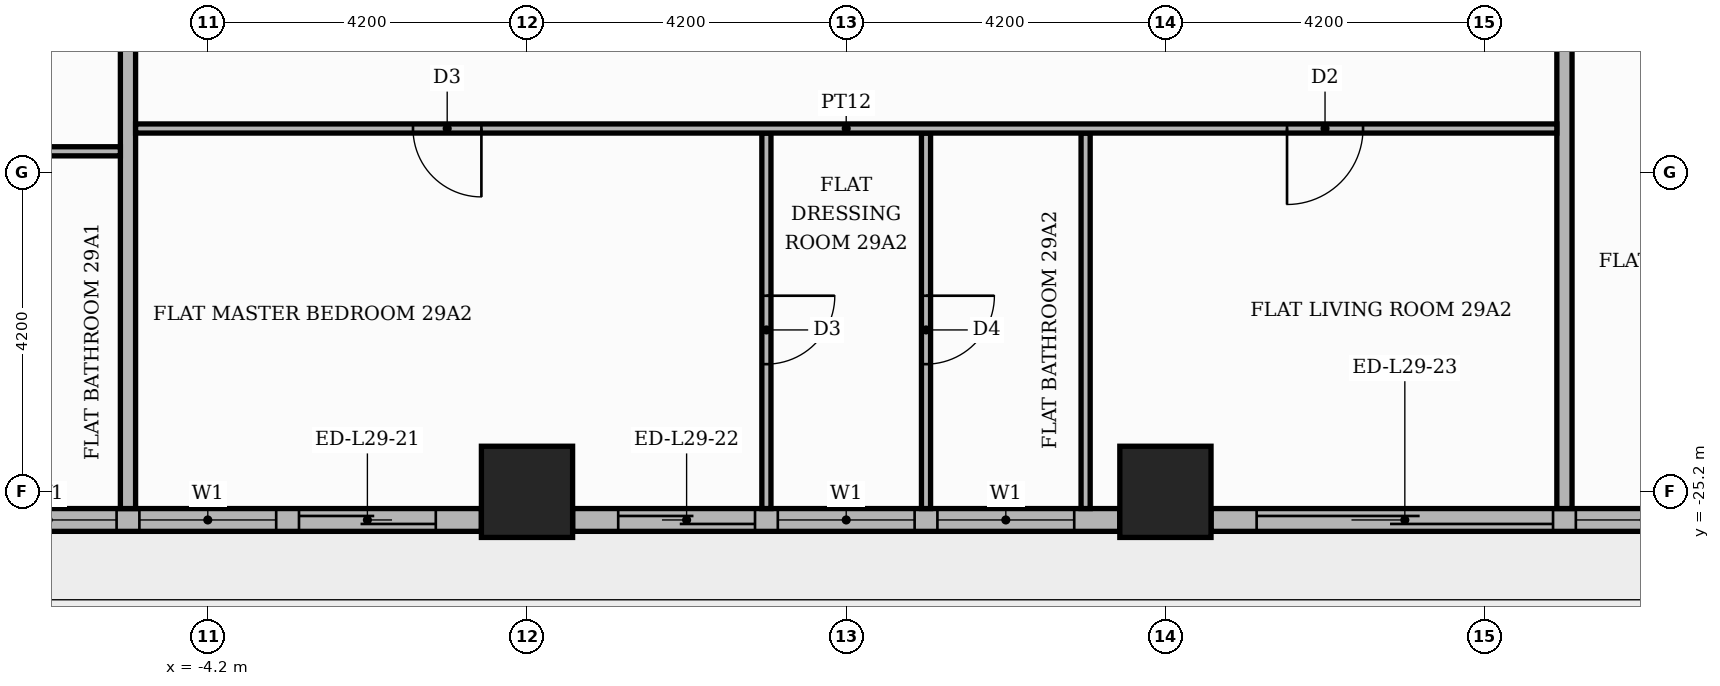
"""IFC4 building model, lengths in metres.
Left out: names, types, materials, properties, quantities, classifications, styles, units other than length and angle.
Written with IfcOpenShell. Run it as: python <this file> out.ifc"""

import sys

from ifc_helpers import new_model, si_unit, direction, frame, frame_2d, origin, origin_2d, place, context, subcontext, project, spatial, rectangle, extrude, element, fill, save


model = new_model("IFC4")
c1 = context("Model", 3, precision=1e-05, world=origin(), true_north=direction((0.0, 1.0)))
c2 = subcontext(c1, "Body", "Model", "MODEL_VIEW")
j1 = project(units=[si_unit("LENGTHUNIT", "METRE"), si_unit("PLANEANGLEUNIT", "RADIAN")], contexts=[c1])
p1 = place(None, origin())
s1 = spatial("IfcSite", under=j1, at=p1, CompositionType="ELEMENT")
p2 = place(p1, origin())
s2 = spatial("IfcBuilding", under=s1, at=p2, CompositionType="ELEMENT")
p3 = place(p2, frame((0.0, 0.0, 122.1)))
s3 = spatial("IfcBuildingStorey", under=s2, at=p3, CompositionType="ELEMENT", Elevation=122.1)
for number, where, z_axis, x_axis in (
    (1, (0.0, -25.2, 0.0), (0.0, 0.0, 1.0), (1.0, 0.0, 0.0)),
    (2, (8.4, -25.2, 0.0), (0.0, 0.0, 1.0), (1.0, 0.0, 0.0)),
):
    element("IfcColumn", number, at=place(p3, frame(where, z_axis=z_axis, x_axis=x_axis)), inside=s3, PredefinedType="COLUMN", context=c2, shape_type="SweptSolid", body=[
        extrude(rectangle(XDim=1.2, YDim=1.2, at=origin_2d()), origin(), (0.0, 0.0, 1.0), 3.9),
    ])
p4 = place(p3, frame((-7.8, -25.57, 0.0), z_axis=(0.0, 0.0, 1.0), x_axis=(1.0, 0.0, 0.0)))
e3 = element("IfcWall", 3, at=p4, inside=s3, PredefinedType="STANDARD", context=c2, shape_type="SweptSolid", body=[
    extrude(rectangle(XDim=7.2, YDim=0.3, at=frame_2d((3.6, 0.0))), origin(), (0.0, 0.0, 1.0), 3.4),
])
p5 = place(p4, frame((0.6, 0.0, 0.9)))
e4 = element("IfcOpeningElement", 4, at=p5, cuts=e3, PredefinedType="OPENING", context=c2, shape_type="SweptSolid", body=[
    extrude(rectangle(XDim=1.8, YDim=2.1, at=frame_2d((0.9, 1.05))), frame((0.0, 0.16, 0.0), z_axis=(0.0, -1.0, 0.0), x_axis=(1.0, 0.0, 0.0)), (0.0, 0.0, 1.0), 0.32),
])
p6 = place(p4, frame((2.7, 0.0, 0.9)))
e5 = element("IfcOpeningElement", 5, at=p6, cuts=e3, PredefinedType="OPENING", context=c2, shape_type="SweptSolid", body=[
    extrude(rectangle(XDim=1.8, YDim=2.1, at=frame_2d((0.9, 1.05))), frame((0.0, 0.16, 0.0), z_axis=(0.0, -1.0, 0.0), x_axis=(1.0, 0.0, 0.0)), (0.0, 0.0, 1.0), 0.32),
])
p7 = place(p4, frame((4.8, 0.0, 0.0)))
e6 = element("IfcOpeningElement", 6, at=p7, cuts=e3, PredefinedType="OPENING", context=c2, shape_type="SweptSolid", body=[
    extrude(rectangle(XDim=1.8, YDim=2.4, at=frame_2d((0.9, 1.2))), frame((0.0, 0.16, 0.0), z_axis=(0.0, -1.0, 0.0), x_axis=(1.0, 0.0, 0.0)), (0.0, 0.0, 1.0), 0.32),
])
p8 = place(p3, frame((0.6, -25.57, 0.0), z_axis=(0.0, 0.0, 1.0), x_axis=(1.0, 0.0, 0.0)))
e7 = element("IfcWall", 7, at=p8, inside=s3, PredefinedType="STANDARD", context=c2, shape_type="SweptSolid", body=[
    extrude(rectangle(XDim=7.2, YDim=0.3, at=frame_2d((3.6, 0.0))), origin(), (0.0, 0.0, 1.0), 3.4),
])
p9 = place(p8, frame((0.6, 0.0, 0.0)))
e8 = element("IfcOpeningElement", 8, at=p9, cuts=e7, PredefinedType="OPENING", context=c2, shape_type="SweptSolid", body=[
    extrude(rectangle(XDim=1.8, YDim=2.4, at=frame_2d((0.9, 1.2))), frame((0.0, 0.16, 0.0), z_axis=(0.0, -1.0, 0.0), x_axis=(1.0, 0.0, 0.0)), (0.0, 0.0, 1.0), 0.32),
])
p10 = place(p8, frame((2.7, 0.0, 0.9)))
e9 = element("IfcOpeningElement", 9, at=p10, cuts=e7, PredefinedType="OPENING", context=c2, shape_type="SweptSolid", body=[
    extrude(rectangle(XDim=1.8, YDim=2.1, at=frame_2d((0.9, 1.05))), frame((0.0, 0.16, 0.0), z_axis=(0.0, -1.0, 0.0), x_axis=(1.0, 0.0, 0.0)), (0.0, 0.0, 1.0), 0.32),
])
p11 = place(p8, frame((4.8, 0.0, 0.9)))
e10 = element("IfcOpeningElement", 10, at=p11, cuts=e7, PredefinedType="OPENING", context=c2, shape_type="SweptSolid", body=[
    extrude(rectangle(XDim=1.8, YDim=2.1, at=frame_2d((0.9, 1.05))), frame((0.0, 0.16, 0.0), z_axis=(0.0, -1.0, 0.0), x_axis=(1.0, 0.0, 0.0)), (0.0, 0.0, 1.0), 0.32),
])
p12 = place(p3, frame((9.0, -25.57, 0.0), z_axis=(0.0, 0.0, 1.0), x_axis=(1.0, 0.0, 0.0)))
e11 = element("IfcWall", 11, at=p12, inside=s3, PredefinedType="STANDARD", context=c2, shape_type="SweptSolid", body=[
    extrude(rectangle(XDim=7.2, YDim=0.3, at=frame_2d((3.6, 0.0))), origin(), (0.0, 0.0, 1.0), 3.4),
])
p13 = place(p12, frame((0.6, 0.0, 0.0)))
e12 = element("IfcOpeningElement", 12, at=p13, cuts=e11, PredefinedType="OPENING", context=c2, shape_type="SweptSolid", body=[
    extrude(rectangle(XDim=3.9, YDim=2.4, at=frame_2d((1.95, 1.2))), frame((0.0, 0.16, 0.0), z_axis=(0.0, -1.0, 0.0), x_axis=(1.0, 0.0, 0.0)), (0.0, 0.0, 1.0), 0.32),
])
p14 = place(p12, frame((4.8, 0.0, 0.9)))
e13 = element("IfcOpeningElement", 13, at=p14, cuts=e11, PredefinedType="OPENING", context=c2, shape_type="SweptSolid", body=[
    extrude(rectangle(XDim=1.8, YDim=2.1, at=frame_2d((0.9, 1.05))), frame((0.0, 0.16, 0.0), z_axis=(0.0, -1.0, 0.0), x_axis=(1.0, 0.0, 0.0)), (0.0, 0.0, 1.0), 0.32),
])
p15 = place(p3, frame((-5.25, -25.42, 0.0), z_axis=(0.0, 0.0, 1.0), x_axis=(0.0, 1.0, 0.0)))
e14 = element("IfcWall", 14, at=p15, inside=s3, PredefinedType="PARTITIONING", context=c2, shape_type="SweptSolid", body=[
    extrude(rectangle(XDim=11.67, YDim=0.2, at=frame_2d((5.835, 0.0))), origin(), (0.0, 0.0, 1.0), 3.4),
])
p16 = place(p3, frame((3.15, -25.42, 0.0), z_axis=(0.0, 0.0, 1.0), x_axis=(0.0, 1.0, 0.0)))
e15 = element("IfcWall", 15, at=p16, inside=s3, PredefinedType="PARTITIONING", context=c2, shape_type="SweptSolid", body=[
    extrude(rectangle(XDim=4.94, YDim=0.12, at=frame_2d((2.47, 0.0))), origin(), (0.0, 0.0, 1.0), 3.4),
])
p17 = place(p16, frame((1.9, 0.0, 0.0)))
e16 = element("IfcOpeningElement", 16, at=p17, cuts=e15, PredefinedType="OPENING", context=c2, shape_type="SweptSolid", body=[
    extrude(rectangle(XDim=0.9, YDim=2.1, at=frame_2d((0.45, 1.05))), frame((0.0, 0.07, 0.0), z_axis=(0.0, -1.0, 0.0), x_axis=(1.0, 0.0, 0.0)), (0.0, 0.0, 1.0), 0.14),
])
p18 = place(p3, frame((5.25, -25.42, 0.0), z_axis=(0.0, 0.0, 1.0), x_axis=(0.0, 1.0, 0.0)))
e17 = element("IfcWall", 17, at=p18, inside=s3, PredefinedType="PARTITIONING", context=c2, shape_type="SweptSolid", body=[
    extrude(rectangle(XDim=4.94, YDim=0.12, at=frame_2d((2.47, 0.0))), origin(), (0.0, 0.0, 1.0), 3.4),
])
p19 = place(p18, frame((1.9, 0.0, 0.0)))
e18 = element("IfcOpeningElement", 18, at=p19, cuts=e17, PredefinedType="OPENING", context=c2, shape_type="SweptSolid", body=[
    extrude(rectangle(XDim=0.9, YDim=2.1, at=frame_2d((0.45, 1.05))), frame((0.0, 0.07, 0.0), z_axis=(0.0, -1.0, 0.0), x_axis=(1.0, 0.0, 0.0)), (0.0, 0.0, 1.0), 0.14),
])
p20 = place(p3, frame((7.35, -25.42, 0.0), z_axis=(0.0, 0.0, 1.0), x_axis=(0.0, 1.0, 0.0)))
e19 = element("IfcWall", 19, at=p20, inside=s3, PredefinedType="PARTITIONING", context=c2, shape_type="SweptSolid", body=[
    extrude(rectangle(XDim=4.94, YDim=0.12, at=frame_2d((2.47, 0.0))), origin(), (0.0, 0.0, 1.0), 3.4),
])
p21 = place(p3, frame((13.65, -25.42, 0.0), z_axis=(0.0, 0.0, 1.0), x_axis=(0.0, 1.0, 0.0)))
e20 = element("IfcWall", 20, at=p21, inside=s3, PredefinedType="PARTITIONING", context=c2, shape_type="SweptSolid", body=[
    extrude(rectangle(XDim=11.67, YDim=0.2, at=frame_2d((5.835, 0.0))), origin(), (0.0, 0.0, 1.0), 3.4),
])
p22 = place(p3, frame((-25.42, -20.72, 0.0), z_axis=(0.0, 0.0, 1.0), x_axis=(1.0, 0.0, 0.0)))
e21 = element("IfcWall", 21, at=p22, inside=s3, PredefinedType="PARTITIONING", context=c2, shape_type="SweptSolid", body=[
    extrude(rectangle(XDim=20.07, YDim=0.12, at=frame_2d((10.035, 0.0))), origin(), (0.0, 0.0, 1.0), 3.4),
])
p23 = place(p22, frame((10.22, 0.0, 0.0)))
e22 = element("IfcOpeningElement", 22, at=p23, cuts=e21, PredefinedType="OPENING", context=c2, shape_type="SweptSolid", body=[
    extrude(rectangle(XDim=1.0, YDim=2.1, at=frame_2d((0.5, 1.05))), frame((0.0, 0.07, 0.0), z_axis=(0.0, -1.0, 0.0), x_axis=(1.0, 0.0, 0.0)), (0.0, 0.0, 1.0), 0.14),
])
p24 = place(p22, frame((13.42, 0.0, 0.0)))
e23 = element("IfcOpeningElement", 23, at=p24, cuts=e21, PredefinedType="OPENING", context=c2, shape_type="SweptSolid", body=[
    extrude(rectangle(XDim=0.9, YDim=2.1, at=frame_2d((0.45, 1.05))), frame((0.0, 0.07, 0.0), z_axis=(0.0, -1.0, 0.0), x_axis=(1.0, 0.0, 0.0)), (0.0, 0.0, 1.0), 0.14),
])
p25 = place(p3, frame((-5.15, -20.42, 0.0), z_axis=(0.0, 0.0, 1.0), x_axis=(1.0, 0.0, 0.0)))
e24 = element("IfcWall", 24, at=p25, inside=s3, PredefinedType="PARTITIONING", context=c2, shape_type="SweptSolid", body=[
    extrude(rectangle(XDim=18.7, YDim=0.12, at=frame_2d((9.35, 0.0))), origin(), (0.0, 0.0, 1.0), 3.4),
])
p26 = place(p25, frame((3.65, 0.0, 0.0)))
e25 = element("IfcOpeningElement", 25, at=p26, cuts=e24, PredefinedType="OPENING", context=c2, shape_type="SweptSolid", body=[
    extrude(rectangle(XDim=0.9, YDim=2.1, at=frame_2d((0.45, 1.05))), frame((0.0, 0.07, 0.0), z_axis=(0.0, -1.0, 0.0), x_axis=(1.0, 0.0, 0.0)), (0.0, 0.0, 1.0), 0.14),
])
p27 = place(p25, frame((15.15, 0.0, 0.0)))
e26 = element("IfcOpeningElement", 26, at=p27, cuts=e24, PredefinedType="OPENING", context=c2, shape_type="SweptSolid", body=[
    extrude(rectangle(XDim=1.0, YDim=2.1, at=frame_2d((0.5, 1.05))), frame((0.0, 0.07, 0.0), z_axis=(0.0, -1.0, 0.0), x_axis=(1.0, 0.0, 0.0)), (0.0, 0.0, 1.0), 0.14),
])
p28 = place(p5, origin())
e27 = element("IfcWindow", 27, at=p28, inside=s3, PartitioningType="SINGLE_PANEL", PredefinedType="WINDOW", context=c2, shape_type="SweptSolid", body=[
    extrude(rectangle(XDim=1.8, YDim=2.1, at=frame_2d((0.9, 1.05))), frame((0.0, 0.03, 0.0), z_axis=(0.0, -1.0, 0.0), x_axis=(1.0, 0.0, 0.0)), (0.0, 0.0, 1.0), 0.06),
])
fill(e4, e27)
p29 = place(p6, origin())
e28 = element("IfcWindow", 28, at=p29, inside=s3, PartitioningType="SINGLE_PANEL", PredefinedType="WINDOW", context=c2, shape_type="SweptSolid", body=[
    extrude(rectangle(XDim=1.8, YDim=2.1, at=frame_2d((0.9, 1.05))), frame((0.0, 0.03, 0.0), z_axis=(0.0, -1.0, 0.0), x_axis=(1.0, 0.0, 0.0)), (0.0, 0.0, 1.0), 0.06),
])
fill(e5, e28)
p30 = place(p7, origin())
e29 = element("IfcDoor", 29, at=p30, inside=s3, OperationType="SLIDING_TO_RIGHT", PredefinedType="DOOR", context=c2, shape_type="SweptSolid", body=[
    extrude(rectangle(XDim=1.8, YDim=2.4, at=frame_2d((0.9, 1.2))), frame((0.0, 0.025, 0.0), z_axis=(0.0, -1.0, 0.0), x_axis=(1.0, 0.0, 0.0)), (0.0, 0.0, 1.0), 0.05),
])
fill(e6, e29)
p31 = place(p9, origin())
e30 = element("IfcDoor", 30, at=p31, inside=s3, OperationType="SLIDING_TO_LEFT", PredefinedType="DOOR", context=c2, shape_type="SweptSolid", body=[
    extrude(rectangle(XDim=1.8, YDim=2.4, at=frame_2d((0.9, 1.2))), frame((0.0, 0.025, 0.0), z_axis=(0.0, -1.0, 0.0), x_axis=(1.0, 0.0, 0.0)), (0.0, 0.0, 1.0), 0.05),
])
fill(e8, e30)
p32 = place(p10, origin())
e31 = element("IfcWindow", 31, at=p32, inside=s3, PartitioningType="SINGLE_PANEL", PredefinedType="WINDOW", context=c2, shape_type="SweptSolid", body=[
    extrude(rectangle(XDim=1.8, YDim=2.1, at=frame_2d((0.9, 1.05))), frame((0.0, 0.03, 0.0), z_axis=(0.0, -1.0, 0.0), x_axis=(1.0, 0.0, 0.0)), (0.0, 0.0, 1.0), 0.06),
])
fill(e9, e31)
p33 = place(p11, origin())
e32 = element("IfcWindow", 32, at=p33, inside=s3, PartitioningType="SINGLE_PANEL", PredefinedType="WINDOW", context=c2, shape_type="SweptSolid", body=[
    extrude(rectangle(XDim=1.8, YDim=2.1, at=frame_2d((0.9, 1.05))), frame((0.0, 0.03, 0.0), z_axis=(0.0, -1.0, 0.0), x_axis=(1.0, 0.0, 0.0)), (0.0, 0.0, 1.0), 0.06),
])
fill(e10, e32)
p34 = place(p13, origin())
e33 = element("IfcDoor", 33, at=p34, inside=s3, OperationType="SLIDING_TO_LEFT", PredefinedType="DOOR", context=c2, shape_type="SweptSolid", body=[
    extrude(rectangle(XDim=3.9, YDim=2.4, at=frame_2d((1.95, 1.2))), frame((0.0, 0.025, 0.0), z_axis=(0.0, -1.0, 0.0), x_axis=(1.0, 0.0, 0.0)), (0.0, 0.0, 1.0), 0.05),
])
fill(e12, e33)
p35 = place(p14, origin())
e34 = element("IfcWindow", 34, at=p35, inside=s3, PartitioningType="SINGLE_PANEL", PredefinedType="WINDOW", context=c2, shape_type="SweptSolid", body=[
    extrude(rectangle(XDim=1.8, YDim=2.1, at=frame_2d((0.9, 1.05))), frame((0.0, 0.03, 0.0), z_axis=(0.0, -1.0, 0.0), x_axis=(1.0, 0.0, 0.0)), (0.0, 0.0, 1.0), 0.06),
])
fill(e13, e34)
p36 = place(p26, frame((0.9, 0.0, 0.0), z_axis=(0.0, 0.0, 1.0), x_axis=(-1.0, 0.0, 0.0)))
e35 = element("IfcDoor", 35, at=p36, inside=s3, OperationType="SINGLE_SWING_RIGHT", PredefinedType="DOOR", context=c2, shape_type="SweptSolid", body=[
    extrude(rectangle(XDim=0.9, YDim=2.1, at=frame_2d((0.45, 1.05))), frame((0.0, 0.025, 0.0), z_axis=(0.0, -1.0, 0.0), x_axis=(1.0, 0.0, 0.0)), (0.0, 0.0, 1.0), 0.05),
])
fill(e25, e35)
p37 = place(p17, frame((0.9, 0.0, 0.0), z_axis=(0.0, 0.0, 1.0), x_axis=(-1.0, 0.0, 0.0)))
e36 = element("IfcDoor", 36, at=p37, inside=s3, OperationType="SINGLE_SWING_RIGHT", PredefinedType="DOOR", context=c2, shape_type="SweptSolid", body=[
    extrude(rectangle(XDim=0.9, YDim=2.1, at=frame_2d((0.45, 1.05))), frame((0.0, 0.025, 0.0), z_axis=(0.0, -1.0, 0.0), x_axis=(1.0, 0.0, 0.0)), (0.0, 0.0, 1.0), 0.05),
])
fill(e16, e36)
p38 = place(p19, frame((0.9, 0.0, 0.0), z_axis=(0.0, 0.0, 1.0), x_axis=(-1.0, 0.0, 0.0)))
e37 = element("IfcDoor", 37, at=p38, inside=s3, OperationType="SINGLE_SWING_RIGHT", PredefinedType="DOOR", context=c2, shape_type="SweptSolid", body=[
    extrude(rectangle(XDim=0.9, YDim=2.1, at=frame_2d((0.45, 1.05))), frame((0.0, 0.025, 0.0), z_axis=(0.0, -1.0, 0.0), x_axis=(1.0, 0.0, 0.0)), (0.0, 0.0, 1.0), 0.05),
])
fill(e18, e37)
p39 = place(p27, frame((1.0, 0.0, 0.0), z_axis=(0.0, 0.0, 1.0), x_axis=(-1.0, 0.0, 0.0)))
e38 = element("IfcDoor", 38, at=p39, inside=s3, OperationType="SINGLE_SWING_LEFT", PredefinedType="DOOR", context=c2, shape_type="SweptSolid", body=[
    extrude(rectangle(XDim=1.0, YDim=2.1, at=frame_2d((0.5, 1.05))), frame((0.0, 0.025, 0.0), z_axis=(0.0, -1.0, 0.0), x_axis=(1.0, 0.0, 0.0)), (0.0, 0.0, 1.0), 0.05),
])
fill(e26, e38)
save(model, sys.argv[1])
